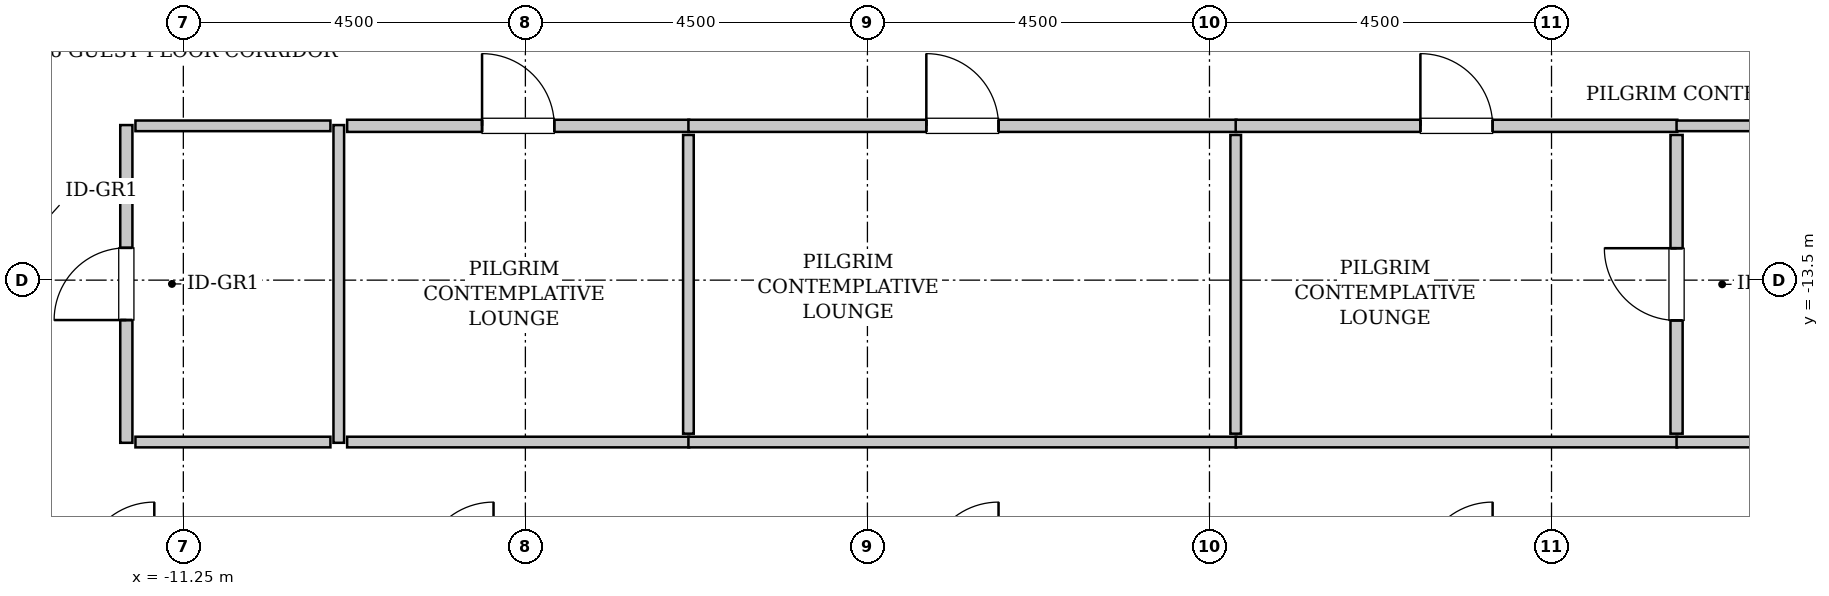
"""IFC4 building model, lengths in metres.
Left out: names, types, materials, properties, quantities, classifications, styles, units other than length and angle.
Written with IfcOpenShell. Run it as: python <this file> out.ifc"""

import sys

from ifc_helpers import new_model, si_unit, direction, frame, frame_2d, origin, place, context, subcontext, project, spatial, rectangle, extrude, source, transform, mapped, element, fill, save


model = new_model("IFC4")
c1 = context("Model", 3, precision=1e-05, world=origin(), true_north=direction((0.0, 1.0)))
c2 = subcontext(c1, "Body", "Model", "MODEL_VIEW")
j1 = project(units=[si_unit("LENGTHUNIT", "METRE"), si_unit("PLANEANGLEUNIT", "RADIAN")], contexts=[c1])
p1 = place(None, origin())
s1 = spatial("IfcSite", under=j1, at=p1, CompositionType="ELEMENT")
p2 = place(p1, origin())
s2 = spatial("IfcBuilding", under=s1, at=p2, CompositionType="ELEMENT")
p3 = place(p2, frame((0.0, 0.0, 148.8)))
s3 = spatial("IfcBuildingStorey", under=s2, at=p3, CompositionType="ELEMENT", Elevation=148.8)
m1 = source(origin(), c2, "Body", "SweptSolid", [
    extrude(rectangle(XDim=4.18, YDim=0.16, at=frame_2d((2.09, 0.0))), origin(), (0.0, 0.0, 1.0), 3.535),
])
p4 = place(p3, frame((-12.0, -15.64, 0.0), z_axis=(0.0, 0.0, 1.0), x_axis=(0.0, 1.0, 0.0)))
e1 = element("IfcWall", 1, at=p4, inside=s3, PredefinedType="PARTITIONING", context=c2, shape_type="MappedRepresentation", body=[
    mapped(m1, transform((0.0, 0.0, 0.0), x_axis=(1.0, 0.0, 0.0), y_axis=(0.0, 1.0, 0.0), z_axis=(0.0, 0.0, 1.0), scale=1.0)),
])
p5 = place(p4, frame((1.615, 0.0, 0.0)))
e2 = element("IfcOpeningElement", 2, at=p5, cuts=e1, PredefinedType="OPENING", context=c2, shape_type="SweptSolid", body=[
    extrude(rectangle(XDim=0.95, YDim=2.1, at=frame_2d((0.475, 1.05))), frame((0.0, 0.09, 0.0), z_axis=(0.0, -1.0, 0.0), x_axis=(1.0, 0.0, 0.0)), (0.0, 0.0, 1.0), 0.18),
])
m2 = source(origin(), c2, "Body", "SweptSolid", [
    extrude(rectangle(XDim=4.18, YDim=0.14, at=frame_2d((2.09, 0.0))), origin(), (0.0, 0.0, 1.0), 3.535),
])
p6 = place(p3, frame((-9.205, -15.64, 0.0), z_axis=(0.0, 0.0, 1.0), x_axis=(0.0, 1.0, 0.0)))
e3 = element("IfcWall", 3, at=p6, inside=s3, PredefinedType="PARTITIONING", context=c2, shape_type="MappedRepresentation", body=[
    mapped(m2, transform((0.0, 0.0, 0.0), x_axis=(1.0, 0.0, 0.0), y_axis=(0.0, 1.0, 0.0), z_axis=(0.0, 0.0, 1.0), scale=1.0)),
])
m3 = source(origin(), c2, "Body", "SweptSolid", [
    extrude(rectangle(XDim=2.565, YDim=0.14, at=frame_2d((1.282, 0.0))), origin(), (0.0, 0.0, 1.0), 3.535),
])
for number, where, z_axis, x_axis in (
    (4, (-11.88, -11.47, 0.0), (0.0, 0.0, 1.0), (1.0, 0.0, 0.0)),
    (5, (-11.88, -15.63, 0.0), (0.0, 0.0, 1.0), (1.0, 0.0, 0.0)),
):
    element("IfcWall", number, at=place(p3, frame(where, z_axis=z_axis, x_axis=x_axis)), inside=s3, PredefinedType="PARTITIONING", context=c2, shape_type="MappedRepresentation", body=[
        mapped(m3, transform((0.0, 0.0, 0.0), x_axis=(1.0, 0.0, 0.0), y_axis=(0.0, 1.0, 0.0), z_axis=(0.0, 0.0, 1.0), scale=1.0)),
    ])
m4 = source(origin(), c2, "Body", "SweptSolid", [
    extrude(rectangle(XDim=4.5, YDim=0.16, at=frame_2d((2.25, 0.0))), origin(), (0.0, 0.0, 1.0), 3.535),
])
p7 = place(p3, frame((-9.095, -11.47, 0.0), z_axis=(0.0, 0.0, 1.0), x_axis=(1.0, 0.0, 0.0)))
e6 = element("IfcWall", 6, at=p7, inside=s3, PredefinedType="PARTITIONING", context=c2, shape_type="MappedRepresentation", body=[
    mapped(m4, transform((0.0, 0.0, 0.0), x_axis=(1.0, 0.0, 0.0), y_axis=(0.0, 1.0, 0.0), z_axis=(0.0, 0.0, 1.0), scale=1.0)),
])
p8 = place(p7, frame((1.775, 0.0, 0.0)))
e7 = element("IfcOpeningElement", 7, at=p8, cuts=e6, PredefinedType="OPENING", context=c2, shape_type="SweptSolid", body=[
    extrude(rectangle(XDim=0.95, YDim=2.1, at=frame_2d((0.475, 1.05))), frame((0.0, 0.09, 0.0), z_axis=(0.0, -1.0, 0.0), x_axis=(1.0, 0.0, 0.0)), (0.0, 0.0, 1.0), 0.18),
])
m5 = source(origin(), c2, "Body", "SweptSolid", [
    extrude(rectangle(XDim=4.5, YDim=0.14, at=frame_2d((2.25, 0.0))), origin(), (0.0, 0.0, 1.0), 3.535),
])
p9 = place(p3, frame((-9.095, -15.63, 0.0), z_axis=(0.0, 0.0, 1.0), x_axis=(1.0, 0.0, 0.0)))
e8 = element("IfcWall", 8, at=p9, inside=s3, PredefinedType="PARTITIONING", context=c2, shape_type="MappedRepresentation", body=[
    mapped(m5, transform((0.0, 0.0, 0.0), x_axis=(1.0, 0.0, 0.0), y_axis=(0.0, 1.0, 0.0), z_axis=(0.0, 0.0, 1.0), scale=1.0)),
])
m6 = source(origin(), c2, "Body", "SweptSolid", [
    extrude(rectangle(XDim=3.93, YDim=0.14, at=frame_2d((1.965, 0.0))), origin(), (0.0, 0.0, 1.0), 3.535),
])
p10 = place(p3, frame((-4.605, -15.52, 0.0), z_axis=(0.0, 0.0, 1.0), x_axis=(0.0, 1.0, 0.0)))
e9 = element("IfcWall", 9, at=p10, inside=s3, PredefinedType="PARTITIONING", context=c2, shape_type="MappedRepresentation", body=[
    mapped(m6, transform((0.0, 0.0, 0.0), x_axis=(1.0, 0.0, 0.0), y_axis=(0.0, 1.0, 0.0), z_axis=(0.0, 0.0, 1.0), scale=1.0)),
])
m7 = source(origin(), c2, "Body", "SweptSolid", [
    extrude(rectangle(XDim=7.21, YDim=0.16, at=frame_2d((3.605, 0.0))), origin(), (0.0, 0.0, 1.0), 3.535),
])
p11 = place(p3, frame((-4.605, -11.47, 0.0), z_axis=(0.0, 0.0, 1.0), x_axis=(1.0, 0.0, 0.0)))
e10 = element("IfcWall", 10, at=p11, inside=s3, PredefinedType="PARTITIONING", context=c2, shape_type="MappedRepresentation", body=[
    mapped(m7, transform((0.0, 0.0, 0.0), x_axis=(1.0, 0.0, 0.0), y_axis=(0.0, 1.0, 0.0), z_axis=(0.0, 0.0, 1.0), scale=1.0)),
])
p12 = place(p11, frame((3.13, 0.0, 0.0)))
e11 = element("IfcOpeningElement", 11, at=p12, cuts=e10, PredefinedType="OPENING", context=c2, shape_type="SweptSolid", body=[
    extrude(rectangle(XDim=0.95, YDim=2.1, at=frame_2d((0.475, 1.05))), frame((0.0, 0.09, 0.0), z_axis=(0.0, -1.0, 0.0), x_axis=(1.0, 0.0, 0.0)), (0.0, 0.0, 1.0), 0.18),
])
m8 = source(origin(), c2, "Body", "SweptSolid", [
    extrude(rectangle(XDim=7.21, YDim=0.14, at=frame_2d((3.605, 0.0))), origin(), (0.0, 0.0, 1.0), 3.535),
])
p13 = place(p3, frame((-4.605, -15.63, 0.0), z_axis=(0.0, 0.0, 1.0), x_axis=(1.0, 0.0, 0.0)))
e12 = element("IfcWall", 12, at=p13, inside=s3, PredefinedType="PARTITIONING", context=c2, shape_type="MappedRepresentation", body=[
    mapped(m8, transform((0.0, 0.0, 0.0), x_axis=(1.0, 0.0, 0.0), y_axis=(0.0, 1.0, 0.0), z_axis=(0.0, 0.0, 1.0), scale=1.0)),
])
p14 = place(p3, frame((2.595, -15.52, 0.0), z_axis=(0.0, 0.0, 1.0), x_axis=(0.0, 1.0, 0.0)))
e13 = element("IfcWall", 13, at=p14, inside=s3, PredefinedType="PARTITIONING", context=c2, shape_type="MappedRepresentation", body=[
    mapped(m6, transform((0.0, 0.0, 0.0), x_axis=(1.0, 0.0, 0.0), y_axis=(0.0, 1.0, 0.0), z_axis=(0.0, 0.0, 1.0), scale=1.0)),
])
m9 = source(origin(), c2, "Body", "SweptSolid", [
    extrude(rectangle(XDim=5.81, YDim=0.16, at=frame_2d((2.905, 0.0))), origin(), (0.0, 0.0, 1.0), 3.535),
])
p15 = place(p3, frame((2.595, -11.47, 0.0), z_axis=(0.0, 0.0, 1.0), x_axis=(1.0, 0.0, 0.0)))
e14 = element("IfcWall", 14, at=p15, inside=s3, PredefinedType="PARTITIONING", context=c2, shape_type="MappedRepresentation", body=[
    mapped(m9, transform((0.0, 0.0, 0.0), x_axis=(1.0, 0.0, 0.0), y_axis=(0.0, 1.0, 0.0), z_axis=(0.0, 0.0, 1.0), scale=1.0)),
])
p16 = place(p15, frame((2.43, 0.0, 0.0)))
e15 = element("IfcOpeningElement", 15, at=p16, cuts=e14, PredefinedType="OPENING", context=c2, shape_type="SweptSolid", body=[
    extrude(rectangle(XDim=0.95, YDim=2.1, at=frame_2d((0.475, 1.05))), frame((0.0, 0.09, 0.0), z_axis=(0.0, -1.0, 0.0), x_axis=(1.0, 0.0, 0.0)), (0.0, 0.0, 1.0), 0.18),
])
m10 = source(origin(), c2, "Body", "SweptSolid", [
    extrude(rectangle(XDim=5.81, YDim=0.14, at=frame_2d((2.905, 0.0))), origin(), (0.0, 0.0, 1.0), 3.535),
])
p17 = place(p3, frame((2.595, -15.63, 0.0), z_axis=(0.0, 0.0, 1.0), x_axis=(1.0, 0.0, 0.0)))
e16 = element("IfcWall", 16, at=p17, inside=s3, PredefinedType="PARTITIONING", context=c2, shape_type="MappedRepresentation", body=[
    mapped(m10, transform((0.0, 0.0, 0.0), x_axis=(1.0, 0.0, 0.0), y_axis=(0.0, 1.0, 0.0), z_axis=(0.0, 0.0, 1.0), scale=1.0)),
])
m11 = source(origin(), c2, "Body", "SweptSolid", [
    extrude(rectangle(XDim=3.93, YDim=0.16, at=frame_2d((1.965, 0.0))), origin(), (0.0, 0.0, 1.0), 3.535),
])
p18 = place(p3, frame((8.395, -15.52, 0.0), z_axis=(0.0, 0.0, 1.0), x_axis=(0.0, 1.0, 0.0)))
e17 = element("IfcWall", 17, at=p18, inside=s3, PredefinedType="PARTITIONING", context=c2, shape_type="MappedRepresentation", body=[
    mapped(m11, transform((0.0, 0.0, 0.0), x_axis=(1.0, 0.0, 0.0), y_axis=(0.0, 1.0, 0.0), z_axis=(0.0, 0.0, 1.0), scale=1.0)),
])
p19 = place(p18, frame((1.49, 0.0, 0.0)))
e18 = element("IfcOpeningElement", 18, at=p19, cuts=e17, PredefinedType="OPENING", context=c2, shape_type="SweptSolid", body=[
    extrude(rectangle(XDim=0.95, YDim=2.1, at=frame_2d((0.475, 1.05))), frame((0.0, 0.09, 0.0), z_axis=(0.0, -1.0, 0.0), x_axis=(1.0, 0.0, 0.0)), (0.0, 0.0, 1.0), 0.18),
])
m12 = source(origin(), c2, "Body", "SweptSolid", [
    extrude(rectangle(XDim=3.495, YDim=0.14, at=frame_2d((1.748, 0.0))), origin(), (0.0, 0.0, 1.0), 3.535),
])
for number, where, z_axis, x_axis in (
    (19, (8.395, -11.47, 0.0), (0.0, 0.0, 1.0), (1.0, 0.0, 0.0)),
    (20, (8.395, -15.63, 0.0), (0.0, 0.0, 1.0), (1.0, 0.0, 0.0)),
):
    element("IfcWall", number, at=place(p3, frame(where, z_axis=z_axis, x_axis=x_axis)), inside=s3, PredefinedType="PARTITIONING", context=c2, shape_type="MappedRepresentation", body=[
        mapped(m12, transform((0.0, 0.0, 0.0), x_axis=(1.0, 0.0, 0.0), y_axis=(0.0, 1.0, 0.0), z_axis=(0.0, 0.0, 1.0), scale=1.0)),
    ])
m13 = source(origin(), c2, "Body", "SweptSolid", [
    extrude(rectangle(XDim=0.95, YDim=2.1, at=frame_2d((0.475, 1.05))), frame((0.0, 0.025, 0.0), z_axis=(0.0, -1.0, 0.0), x_axis=(1.0, 0.0, 0.0)), (0.0, 0.0, 1.0), 0.05),
])
p20 = place(p5, origin())
e21 = element("IfcDoor", 21, at=p20, inside=s3, OperationType="SINGLE_SWING_LEFT", PredefinedType="DOOR", context=c2, shape_type="MappedRepresentation", body=[
    mapped(m13, transform((0.0, 0.0, 0.0), x_axis=(1.0, 0.0, 0.0), y_axis=(0.0, 1.0, 0.0), z_axis=(0.0, 0.0, 1.0), scale=1.0)),
])
fill(e2, e21)
p21 = place(p8, origin())
e22 = element("IfcDoor", 22, at=p21, inside=s3, OperationType="SINGLE_SWING_LEFT", PredefinedType="DOOR", context=c2, shape_type="MappedRepresentation", body=[
    mapped(m13, transform((0.0, 0.0, 0.0), x_axis=(1.0, 0.0, 0.0), y_axis=(0.0, 1.0, 0.0), z_axis=(0.0, 0.0, 1.0), scale=1.0)),
])
fill(e7, e22)
p22 = place(p12, origin())
e23 = element("IfcDoor", 23, at=p22, inside=s3, OperationType="SINGLE_SWING_LEFT", PredefinedType="DOOR", context=c2, shape_type="MappedRepresentation", body=[
    mapped(m13, transform((0.0, 0.0, 0.0), x_axis=(1.0, 0.0, 0.0), y_axis=(0.0, 1.0, 0.0), z_axis=(0.0, 0.0, 1.0), scale=1.0)),
])
fill(e11, e23)
p23 = place(p16, origin())
e24 = element("IfcDoor", 24, at=p23, inside=s3, OperationType="SINGLE_SWING_LEFT", PredefinedType="DOOR", context=c2, shape_type="MappedRepresentation", body=[
    mapped(m13, transform((0.0, 0.0, 0.0), x_axis=(1.0, 0.0, 0.0), y_axis=(0.0, 1.0, 0.0), z_axis=(0.0, 0.0, 1.0), scale=1.0)),
])
fill(e15, e24)
p24 = place(p19, origin())
e25 = element("IfcDoor", 25, at=p24, inside=s3, OperationType="SINGLE_SWING_RIGHT", PredefinedType="DOOR", context=c2, shape_type="MappedRepresentation", body=[
    mapped(m13, transform((0.0, 0.0, 0.0), x_axis=(1.0, 0.0, 0.0), y_axis=(0.0, 1.0, 0.0), z_axis=(0.0, 0.0, 1.0), scale=1.0)),
])
fill(e18, e25)
save(model, sys.argv[1])
